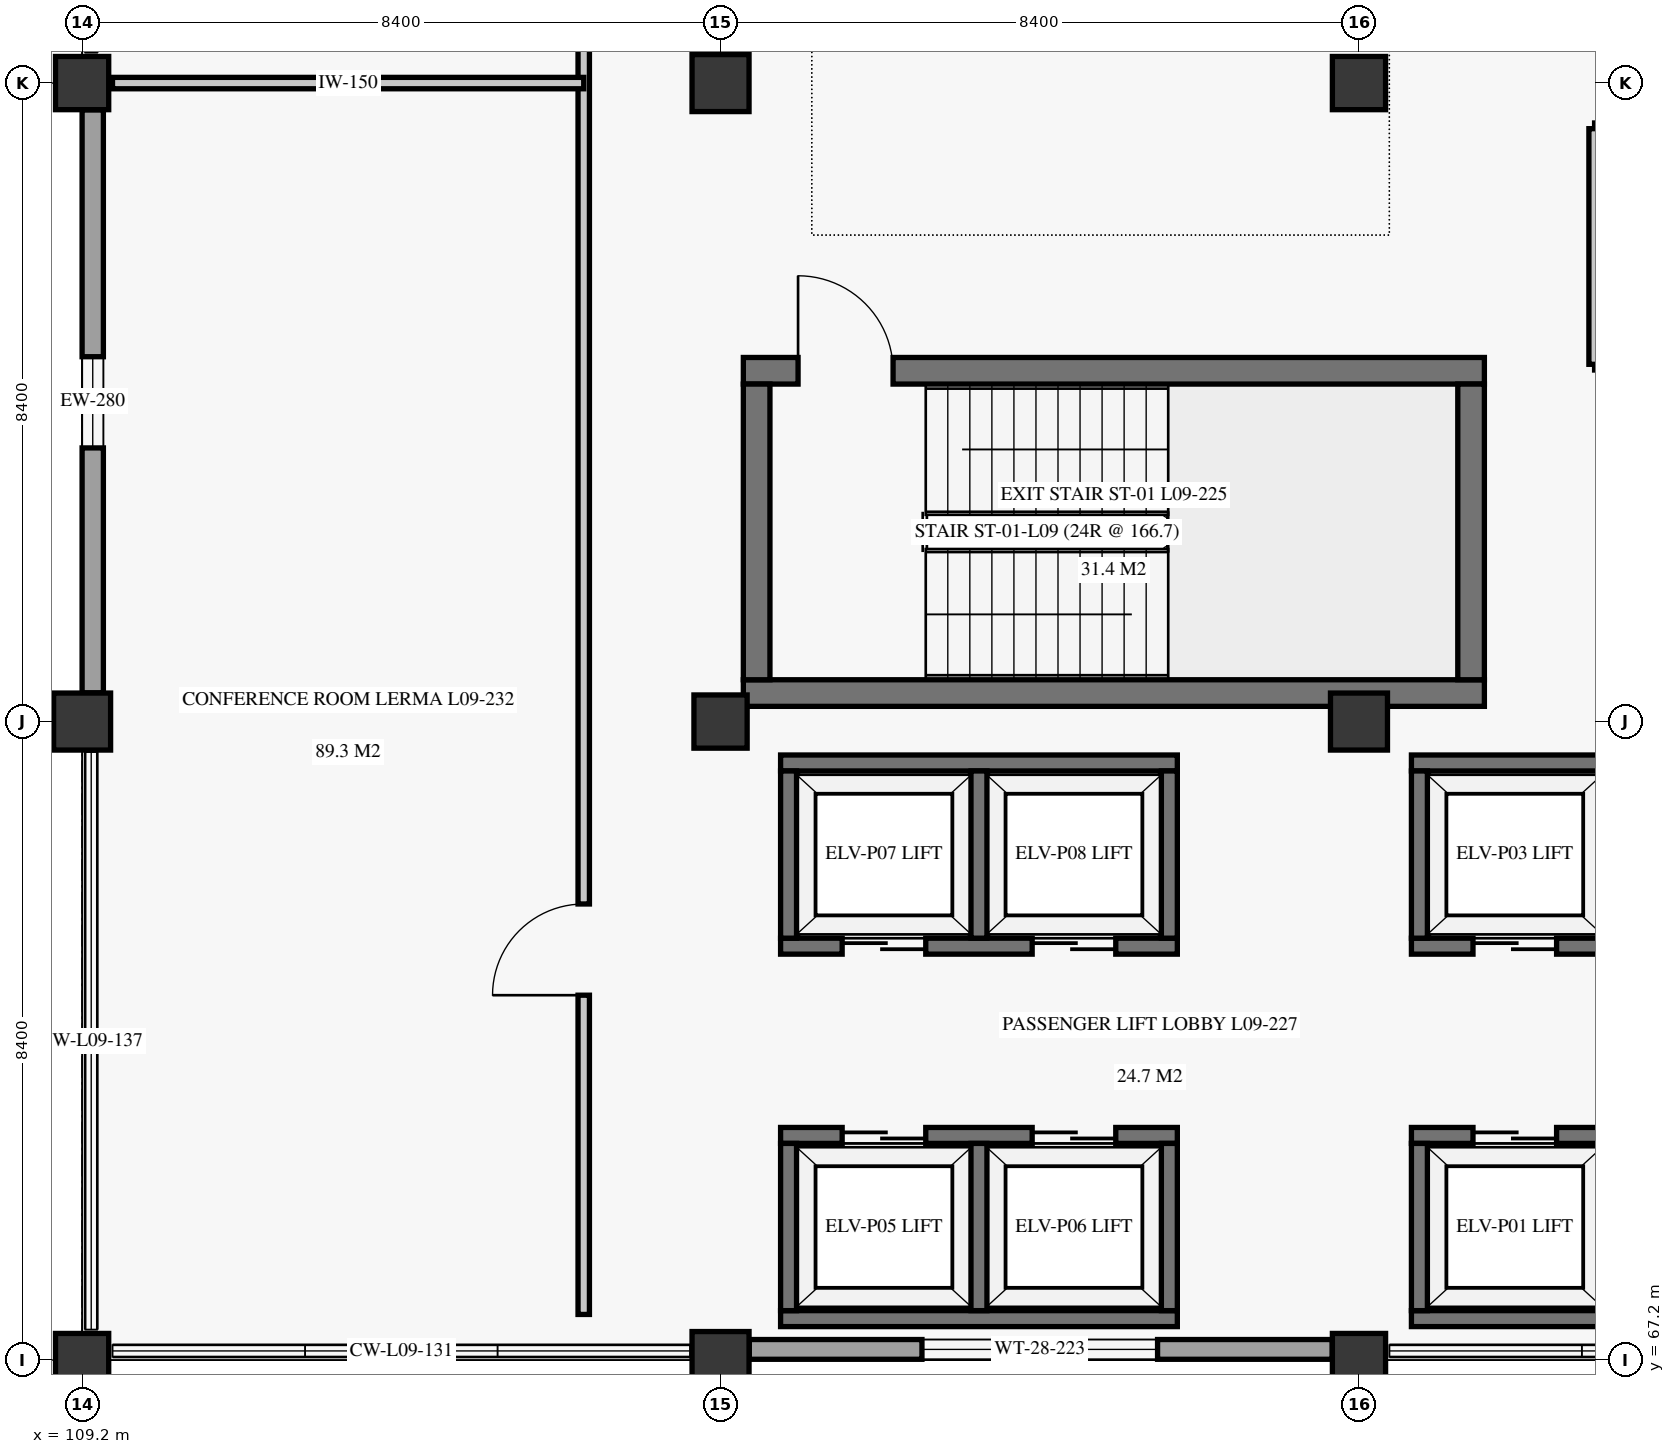
"""IFC4 building model, lengths in metres.
Left out: names, types, materials, properties, quantities, classifications, styles, units other than length and angle.
Written with IfcOpenShell. Run it as: python <this file> out.ifc"""

import sys

from ifc_helpers import new_model, si_unit, direction, frame, frame_2d, origin, origin_2d, place, context, subcontext, project, spatial, rectangle, extrude, element, fill, save


model = new_model("IFC4")
c1 = context("Model", 3, precision=1e-05, world=origin(), true_north=direction((0.0, 1.0)))
c2 = subcontext(c1, "Body", "Model", "MODEL_VIEW")
j1 = project(units=[si_unit("LENGTHUNIT", "METRE"), si_unit("PLANEANGLEUNIT", "RADIAN")], contexts=[c1])
p1 = place(None, origin())
s1 = spatial("IfcSite", under=j1, at=p1, CompositionType="ELEMENT")
p2 = place(p1, origin())
s2 = spatial("IfcBuilding", under=s1, at=p2, CompositionType="ELEMENT")
p3 = place(p2, frame((0.0, 0.0, 38.7)))
s3 = spatial("IfcBuildingStorey", under=s2, at=p3, CompositionType="ELEMENT", Elevation=38.7)
p4 = place(p3, frame((109.2, 67.2, 0.0), z_axis=(0.0, 0.0, 1.0), x_axis=(1.0, 0.0, 0.0)))
e1 = element("IfcColumn", 1, at=p4, inside=s3, PredefinedType="COLUMN", context=c2, shape_type="SweptSolid", body=[
    extrude(rectangle(XDim=0.7, YDim=0.7, at=origin_2d()), origin(), (0.0, 0.0, 1.0), 3.72),
])
p5 = place(p3, frame((109.2, 75.6, 0.0), z_axis=(0.0, 0.0, 1.0), x_axis=(1.0, 0.0, 0.0)))
e2 = element("IfcColumn", 2, at=p5, inside=s3, PredefinedType="COLUMN", context=c2, shape_type="SweptSolid", body=[
    extrude(rectangle(XDim=0.75, YDim=0.75, at=origin_2d()), origin(), (0.0, 0.0, 1.0), 3.72),
])
p6 = place(p3, frame((109.2, 84.0, 0.0), z_axis=(0.0, 0.0, 1.0), x_axis=(1.0, 0.0, 0.0)))
e3 = element("IfcColumn", 3, at=p6, inside=s3, PredefinedType="COLUMN", context=c2, shape_type="SweptSolid", body=[
    extrude(rectangle(XDim=0.7, YDim=0.7, at=origin_2d()), origin(), (0.0, 0.0, 1.0), 3.72),
])
p7 = place(p3, frame((117.6, 67.2, 0.0), z_axis=(0.0, 0.0, 1.0), x_axis=(1.0, 0.0, 0.0)))
e4 = element("IfcColumn", 4, at=p7, inside=s3, PredefinedType="COLUMN", context=c2, shape_type="SweptSolid", body=[
    extrude(rectangle(XDim=0.75, YDim=0.75, at=origin_2d()), origin(), (0.0, 0.0, 1.0), 3.72),
])
p8 = place(p3, frame((117.6, 75.6, 0.0), z_axis=(0.0, 0.0, 1.0), x_axis=(1.0, 0.0, 0.0)))
e5 = element("IfcColumn", 5, at=p8, inside=s3, PredefinedType="COLUMN", context=c2, shape_type="SweptSolid", body=[
    extrude(rectangle(XDim=0.7, YDim=0.7, at=origin_2d()), origin(), (0.0, 0.0, 1.0), 3.72),
])
p9 = place(p3, frame((117.6, 84.0, 0.0), z_axis=(0.0, 0.0, 1.0), x_axis=(1.0, 0.0, 0.0)))
e6 = element("IfcColumn", 6, at=p9, inside=s3, PredefinedType="COLUMN", context=c2, shape_type="SweptSolid", body=[
    extrude(rectangle(XDim=0.75, YDim=0.75, at=origin_2d()), origin(), (0.0, 0.0, 1.0), 3.72),
])
p10 = place(p3, frame((126.0, 67.2, 0.0), z_axis=(0.0, 0.0, 1.0), x_axis=(1.0, 0.0, 0.0)))
e7 = element("IfcColumn", 7, at=p10, inside=s3, PredefinedType="COLUMN", context=c2, shape_type="SweptSolid", body=[
    extrude(rectangle(XDim=0.7, YDim=0.7, at=origin_2d()), origin(), (0.0, 0.0, 1.0), 3.72),
])
p11 = place(p3, frame((126.0, 75.6, 0.0), z_axis=(0.0, 0.0, 1.0), x_axis=(1.0, 0.0, 0.0)))
e8 = element("IfcColumn", 8, at=p11, inside=s3, PredefinedType="COLUMN", context=c2, shape_type="SweptSolid", body=[
    extrude(rectangle(XDim=0.75, YDim=0.75, at=origin_2d()), origin(), (0.0, 0.0, 1.0), 3.72),
])
p12 = place(p3, frame((126.0, 84.0, 0.0), z_axis=(0.0, 0.0, 1.0), x_axis=(1.0, 0.0, 0.0)))
e9 = element("IfcColumn", 9, at=p12, inside=s3, PredefinedType="COLUMN", context=c2, shape_type="SweptSolid", body=[
    extrude(rectangle(XDim=0.7, YDim=0.7, at=origin_2d()), origin(), (0.0, 0.0, 1.0), 3.72),
])
p13 = place(p3, frame((117.978, 67.34, 0.0), z_axis=(0.0, 0.0, 1.0), x_axis=(1.0, 0.0, 0.0)))
e10 = element("IfcWall", 10, at=p13, inside=s3, PredefinedType="SOLIDWALL", context=c2, shape_type="SweptSolid", body=[
    extrude(rectangle(XDim=7.67, YDim=0.26, at=frame_2d((3.835, 0.0))), origin(), (0.0, 0.0, 1.0), 3.04),
])
p14 = place(p13, frame((2.272, 0.0, 0.85)))
e11 = element("IfcOpeningElement", 11, at=p14, cuts=e10, PredefinedType="OPENING", context=c2, shape_type="SweptSolid", body=[
    extrude(rectangle(XDim=3.1, YDim=1.85, at=frame_2d((1.55, 0.925))), frame((0.0, 0.14, 0.0), z_axis=(0.0, -1.0, 0.0), x_axis=(1.0, 0.0, 0.0)), (0.0, 0.0, 1.0), 0.28),
])
p15 = place(p3, frame((109.34, 75.978, 0.0), z_axis=(0.0, 0.0, 1.0), x_axis=(0.0, 1.0, 0.0)))
e12 = element("IfcWall", 12, at=p15, inside=s3, PredefinedType="SOLIDWALL", context=c2, shape_type="SweptSolid", body=[
    extrude(rectangle(XDim=7.67, YDim=0.28, at=frame_2d((3.835, 0.0))), origin(), (0.0, 0.0, 1.0), 3.04),
])
p16 = place(p15, frame((3.222, 0.0, 0.85)))
e13 = element("IfcOpeningElement", 13, at=p16, cuts=e12, PredefinedType="OPENING", context=c2, shape_type="SweptSolid", body=[
    extrude(rectangle(XDim=1.2, YDim=1.6, at=frame_2d((0.6, 0.8))), frame((0.0, 0.15, 0.0), z_axis=(0.0, -1.0, 0.0), x_axis=(1.0, 0.0, 0.0)), (0.0, 0.0, 1.0), 0.3),
])
p17 = place(p3, frame((117.9, 75.975, 0.0), z_axis=(0.0, 0.0, 1.0), x_axis=(1.0, 0.0, 0.0)))
e14 = element("IfcWall", 14, at=p17, inside=s3, PredefinedType="SHEAR", context=c2, shape_type="SweptSolid", body=[
    extrude(rectangle(XDim=9.75, YDim=0.35, at=frame_2d((4.875, 0.0))), origin(), (0.0, 0.0, 1.0), 3.72),
])
p18 = place(p3, frame((117.9, 80.215, 0.0), z_axis=(0.0, 0.0, 1.0), x_axis=(1.0, 0.0, 0.0)))
e15 = element("IfcWall", 15, at=p18, inside=s3, PredefinedType="SHEAR", context=c2, shape_type="SweptSolid", body=[
    extrude(rectangle(XDim=9.75, YDim=0.35, at=frame_2d((4.875, 0.0))), origin(), (0.0, 0.0, 1.0), 3.72),
])
p19 = place(p18, frame((0.72, 0.0, 0.0)))
e16 = element("IfcOpeningElement", 16, at=p19, cuts=e15, PredefinedType="OPENING", context=c2, shape_type="SweptSolid", body=[
    extrude(rectangle(XDim=1.25, YDim=2.2, at=frame_2d((0.625, 1.1))), frame((0.0, 0.185, 0.0), z_axis=(0.0, -1.0, 0.0), x_axis=(1.0, 0.0, 0.0)), (0.0, 0.0, 1.0), 0.37),
])
for number, where, z_axis, x_axis in (
    (17, (118.075, 76.15, 0.0), (0.0, 0.0, 1.0), (0.0, 1.0, 0.0)),
    (18, (127.475, 76.15, 0.0), (0.0, 0.0, 1.0), (0.0, 1.0, 0.0)),
):
    element("IfcWall", number, at=place(p3, frame(where, z_axis=z_axis, x_axis=x_axis)), inside=s3, PredefinedType="SHEAR", context=c2, shape_type="SweptSolid", body=[
        extrude(rectangle(XDim=3.89, YDim=0.35, at=frame_2d((1.945, 0.0))), origin(), (0.0, 0.0, 1.0), 3.72),
    ])
p20 = place(p3, frame((126.69, 67.745, 0.0), z_axis=(0.0, 0.0, 1.0), x_axis=(1.0, 0.0, 0.0)))
e19 = element("IfcWall", 19, at=p20, inside=s3, PredefinedType="SHEAR", context=c2, shape_type="SweptSolid", body=[
    extrude(rectangle(XDim=5.22, YDim=0.21, at=frame_2d((2.61, 0.0))), origin(), (0.0, 0.0, 1.0), 3.72),
])
p21 = place(p3, frame((126.69, 70.155, 0.0), z_axis=(0.0, 0.0, 1.0), x_axis=(1.0, 0.0, 0.0)))
e20 = element("IfcWall", 20, at=p21, inside=s3, PredefinedType="SHEAR", context=c2, shape_type="SweptSolid", body=[
    extrude(rectangle(XDim=5.22, YDim=0.21, at=frame_2d((2.61, 0.0))), origin(), (0.0, 0.0, 1.0), 3.72),
])
p22 = place(p21, frame((0.81, 0.0, 0.0)))
e21 = element("IfcOpeningElement", 21, at=p22, cuts=e20, PredefinedType="OPENING", context=c2, shape_type="SweptSolid", body=[
    extrude(rectangle(XDim=1.1, YDim=2.15, at=frame_2d((0.55, 1.075))), frame((0.0, 0.115, 0.0), z_axis=(0.0, -1.0, 0.0), x_axis=(1.0, 0.0, 0.0)), (0.0, 0.0, 1.0), 0.23),
])
p23 = place(p21, frame((3.31, 0.0, 0.0)))
e22 = element("IfcOpeningElement", 22, at=p23, cuts=e20, PredefinedType="OPENING", context=c2, shape_type="SweptSolid", body=[
    extrude(rectangle(XDim=1.1, YDim=2.15, at=frame_2d((0.55, 1.075))), frame((0.0, 0.115, 0.0), z_axis=(0.0, -1.0, 0.0), x_axis=(1.0, 0.0, 0.0)), (0.0, 0.0, 1.0), 0.23),
])
p24 = place(p3, frame((126.795, 67.85, 0.0), z_axis=(0.0, 0.0, 1.0), x_axis=(0.0, 1.0, 0.0)))
e23 = element("IfcWall", 23, at=p24, inside=s3, PredefinedType="SHEAR", context=c2, shape_type="SweptSolid", body=[
    extrude(rectangle(XDim=2.2, YDim=0.21, at=frame_2d((1.1, 0.0))), origin(), (0.0, 0.0, 1.0), 3.72),
])
p25 = place(p3, frame((126.69, 72.645, 0.0), z_axis=(0.0, 0.0, 1.0), x_axis=(1.0, 0.0, 0.0)))
e24 = element("IfcWall", 24, at=p25, inside=s3, PredefinedType="SHEAR", context=c2, shape_type="SweptSolid", body=[
    extrude(rectangle(XDim=5.22, YDim=0.21, at=frame_2d((2.61, 0.0))), origin(), (0.0, 0.0, 1.0), 3.72),
])
p26 = place(p25, frame((0.81, 0.0, 0.0)))
e25 = element("IfcOpeningElement", 25, at=p26, cuts=e24, PredefinedType="OPENING", context=c2, shape_type="SweptSolid", body=[
    extrude(rectangle(XDim=1.1, YDim=2.15, at=frame_2d((0.55, 1.075))), frame((0.0, 0.115, 0.0), z_axis=(0.0, -1.0, 0.0), x_axis=(1.0, 0.0, 0.0)), (0.0, 0.0, 1.0), 0.23),
])
p27 = place(p25, frame((3.31, 0.0, 0.0)))
e26 = element("IfcOpeningElement", 26, at=p27, cuts=e24, PredefinedType="OPENING", context=c2, shape_type="SweptSolid", body=[
    extrude(rectangle(XDim=1.1, YDim=2.15, at=frame_2d((0.55, 1.075))), frame((0.0, 0.115, 0.0), z_axis=(0.0, -1.0, 0.0), x_axis=(1.0, 0.0, 0.0)), (0.0, 0.0, 1.0), 0.23),
])
p28 = place(p3, frame((126.69, 75.055, 0.0), z_axis=(0.0, 0.0, 1.0), x_axis=(1.0, 0.0, 0.0)))
e27 = element("IfcWall", 27, at=p28, inside=s3, PredefinedType="SHEAR", context=c2, shape_type="SweptSolid", body=[
    extrude(rectangle(XDim=5.22, YDim=0.21, at=frame_2d((2.61, 0.0))), origin(), (0.0, 0.0, 1.0), 3.72),
])
p29 = place(p3, frame((126.795, 72.75, 0.0), z_axis=(0.0, 0.0, 1.0), x_axis=(0.0, 1.0, 0.0)))
e28 = element("IfcWall", 28, at=p29, inside=s3, PredefinedType="SHEAR", context=c2, shape_type="SweptSolid", body=[
    extrude(rectangle(XDim=2.2, YDim=0.21, at=frame_2d((1.1, 0.0))), origin(), (0.0, 0.0, 1.0), 3.72),
])
p30 = place(p3, frame((118.39, 67.745, 0.0), z_axis=(0.0, 0.0, 1.0), x_axis=(1.0, 0.0, 0.0)))
e29 = element("IfcWall", 29, at=p30, inside=s3, PredefinedType="SHEAR", context=c2, shape_type="SweptSolid", body=[
    extrude(rectangle(XDim=5.22, YDim=0.21, at=frame_2d((2.61, 0.0))), origin(), (0.0, 0.0, 1.0), 3.72),
])
p31 = place(p3, frame((118.39, 70.155, 0.0), z_axis=(0.0, 0.0, 1.0), x_axis=(1.0, 0.0, 0.0)))
e30 = element("IfcWall", 30, at=p31, inside=s3, PredefinedType="SHEAR", context=c2, shape_type="SweptSolid", body=[
    extrude(rectangle(XDim=5.22, YDim=0.21, at=frame_2d((2.61, 0.0))), origin(), (0.0, 0.0, 1.0), 3.72),
])
p32 = place(p31, frame((0.81, 0.0, 0.0)))
e31 = element("IfcOpeningElement", 31, at=p32, cuts=e30, PredefinedType="OPENING", context=c2, shape_type="SweptSolid", body=[
    extrude(rectangle(XDim=1.1, YDim=2.15, at=frame_2d((0.55, 1.075))), frame((0.0, 0.115, 0.0), z_axis=(0.0, -1.0, 0.0), x_axis=(1.0, 0.0, 0.0)), (0.0, 0.0, 1.0), 0.23),
])
p33 = place(p31, frame((3.31, 0.0, 0.0)))
e32 = element("IfcOpeningElement", 32, at=p33, cuts=e30, PredefinedType="OPENING", context=c2, shape_type="SweptSolid", body=[
    extrude(rectangle(XDim=1.1, YDim=2.15, at=frame_2d((0.55, 1.075))), frame((0.0, 0.115, 0.0), z_axis=(0.0, -1.0, 0.0), x_axis=(1.0, 0.0, 0.0)), (0.0, 0.0, 1.0), 0.23),
])
for number, where, z_axis, x_axis in (
    (33, (118.495, 67.85, 0.0), (0.0, 0.0, 1.0), (0.0, 1.0, 0.0)),
    (34, (123.505, 67.85, 0.0), (0.0, 0.0, 1.0), (0.0, 1.0, 0.0)),
    (35, (121.0, 67.85, 0.0), (0.0, 0.0, 1.0), (0.0, 1.0, 0.0)),
):
    element("IfcWall", number, at=place(p3, frame(where, z_axis=z_axis, x_axis=x_axis)), inside=s3, PredefinedType="SHEAR", context=c2, shape_type="SweptSolid", body=[
        extrude(rectangle(XDim=2.2, YDim=0.21, at=frame_2d((1.1, 0.0))), origin(), (0.0, 0.0, 1.0), 3.72),
    ])
p34 = place(p3, frame((118.39, 72.645, 0.0), z_axis=(0.0, 0.0, 1.0), x_axis=(1.0, 0.0, 0.0)))
e36 = element("IfcWall", 36, at=p34, inside=s3, PredefinedType="SHEAR", context=c2, shape_type="SweptSolid", body=[
    extrude(rectangle(XDim=5.22, YDim=0.21, at=frame_2d((2.61, 0.0))), origin(), (0.0, 0.0, 1.0), 3.72),
])
p35 = place(p34, frame((0.81, 0.0, 0.0)))
e37 = element("IfcOpeningElement", 37, at=p35, cuts=e36, PredefinedType="OPENING", context=c2, shape_type="SweptSolid", body=[
    extrude(rectangle(XDim=1.1, YDim=2.15, at=frame_2d((0.55, 1.075))), frame((0.0, 0.115, 0.0), z_axis=(0.0, -1.0, 0.0), x_axis=(1.0, 0.0, 0.0)), (0.0, 0.0, 1.0), 0.23),
])
p36 = place(p34, frame((3.31, 0.0, 0.0)))
e38 = element("IfcOpeningElement", 38, at=p36, cuts=e36, PredefinedType="OPENING", context=c2, shape_type="SweptSolid", body=[
    extrude(rectangle(XDim=1.1, YDim=2.15, at=frame_2d((0.55, 1.075))), frame((0.0, 0.115, 0.0), z_axis=(0.0, -1.0, 0.0), x_axis=(1.0, 0.0, 0.0)), (0.0, 0.0, 1.0), 0.23),
])
p37 = place(p3, frame((118.39, 75.055, 0.0), z_axis=(0.0, 0.0, 1.0), x_axis=(1.0, 0.0, 0.0)))
e39 = element("IfcWall", 39, at=p37, inside=s3, PredefinedType="SHEAR", context=c2, shape_type="SweptSolid", body=[
    extrude(rectangle(XDim=5.22, YDim=0.21, at=frame_2d((2.61, 0.0))), origin(), (0.0, 0.0, 1.0), 3.72),
])
for number, where, z_axis, x_axis in (
    (40, (118.495, 72.75, 0.0), (0.0, 0.0, 1.0), (0.0, 1.0, 0.0)),
    (41, (123.505, 72.75, 0.0), (0.0, 0.0, 1.0), (0.0, 1.0, 0.0)),
    (42, (121.0, 72.75, 0.0), (0.0, 0.0, 1.0), (0.0, 1.0, 0.0)),
):
    element("IfcWall", number, at=place(p3, frame(where, z_axis=z_axis, x_axis=x_axis)), inside=s3, PredefinedType="SHEAR", context=c2, shape_type="SweptSolid", body=[
        extrude(rectangle(XDim=2.2, YDim=0.21, at=frame_2d((1.1, 0.0))), origin(), (0.0, 0.0, 1.0), 3.72),
    ])
p38 = place(p3, frame((129.1, 80.3, 0.0), z_axis=(0.0, 0.0, 1.0), x_axis=(0.0, 1.0, 0.0)))
e43 = element("IfcWall", 43, at=p38, inside=s3, PredefinedType="PARTITIONING", context=c2, shape_type="SweptSolid", body=[
    extrude(rectangle(XDim=3.1, YDim=0.15, at=frame_2d((1.55, 0.0))), origin(), (0.0, 0.0, 1.0), 3.34),
])
p39 = place(p3, frame((115.8, 67.8, 0.0), z_axis=(0.0, 0.0, 1.0), x_axis=(0.0, 1.0, 0.0)))
e44 = element("IfcWall", 44, at=p39, inside=s3, PredefinedType="PARTITIONING", context=c2, shape_type="SweptSolid", body=[
    extrude(rectangle(XDim=32.4, YDim=0.15, at=frame_2d((16.2, 0.0))), origin(), (0.0, 0.0, 1.0), 3.34),
])
p40 = place(p39, frame((4.2, 0.0, 0.0)))
e45 = element("IfcOpeningElement", 45, at=p40, cuts=e44, PredefinedType="OPENING", context=c2, shape_type="SweptSolid", body=[
    extrude(rectangle(XDim=1.2, YDim=2.3, at=frame_2d((0.6, 1.15))), frame((0.0, 0.085, 0.0), z_axis=(0.0, -1.0, 0.0), x_axis=(1.0, 0.0, 0.0)), (0.0, 0.0, 1.0), 0.17),
])
p41 = place(p39, frame((21.4, 0.0, 0.0)))
e46 = element("IfcOpeningElement", 46, at=p41, cuts=e44, PredefinedType="OPENING", context=c2, shape_type="SweptSolid", body=[
    extrude(rectangle(XDim=1.2, YDim=2.3, at=frame_2d((0.6, 1.15))), frame((0.0, 0.085, 0.0), z_axis=(0.0, -1.0, 0.0), x_axis=(1.0, 0.0, 0.0)), (0.0, 0.0, 1.0), 0.17),
])
p42 = place(p3, frame((109.6, 84.0, 0.0), z_axis=(0.0, 0.0, 1.0), x_axis=(1.0, 0.0, 0.0)))
e47 = element("IfcWall", 47, at=p42, inside=s3, PredefinedType="PARTITIONING", context=c2, shape_type="SweptSolid", body=[
    extrude(rectangle(XDim=6.2, YDim=0.15, at=frame_2d((3.1, 0.0))), origin(), (0.0, 0.0, 1.0), 3.34),
])
p43 = place(p14, origin())
e48 = element("IfcWindow", 48, at=p43, inside=s3, PartitioningType="SINGLE_PANEL", PredefinedType="WINDOW", context=c2, shape_type="SweptSolid", body=[
    extrude(rectangle(XDim=3.1, YDim=1.85, at=frame_2d((1.55, 0.925))), frame((0.0, 0.03, 0.0), z_axis=(0.0, -1.0, 0.0), x_axis=(1.0, 0.0, 0.0)), (0.0, 0.0, 1.0), 0.06),
])
fill(e11, e48)
p44 = place(p16, origin())
e49 = element("IfcWindow", 49, at=p44, inside=s3, PartitioningType="SINGLE_PANEL", PredefinedType="WINDOW", context=c2, shape_type="SweptSolid", body=[
    extrude(rectangle(XDim=1.2, YDim=1.6, at=frame_2d((0.6, 0.8))), frame((0.0, 0.03, 0.0), z_axis=(0.0, -1.0, 0.0), x_axis=(1.0, 0.0, 0.0)), (0.0, 0.0, 1.0), 0.06),
])
fill(e13, e49)
p45 = place(p19, origin())
e50 = element("IfcDoor", 50, at=p45, inside=s3, OperationType="SINGLE_SWING_LEFT", PredefinedType="DOOR", context=c2, shape_type="SweptSolid", body=[
    extrude(rectangle(XDim=1.25, YDim=2.2, at=frame_2d((0.625, 1.1))), frame((0.0, 0.025, 0.0), z_axis=(0.0, -1.0, 0.0), x_axis=(1.0, 0.0, 0.0)), (0.0, 0.0, 1.0), 0.05),
])
fill(e16, e50)
p46 = place(p22, origin())
e51 = element("IfcDoor", 51, at=p46, inside=s3, OperationType="DOUBLE_DOOR_SLIDING", PredefinedType="DOOR", context=c2, shape_type="SweptSolid", body=[
    extrude(rectangle(XDim=1.1, YDim=2.15, at=frame_2d((0.55, 1.075))), frame((0.0, 0.025, 0.0), z_axis=(0.0, -1.0, 0.0), x_axis=(1.0, 0.0, 0.0)), (0.0, 0.0, 1.0), 0.05),
])
fill(e21, e51)
p47 = place(p26, origin())
e52 = element("IfcDoor", 52, at=p47, inside=s3, OperationType="DOUBLE_DOOR_SLIDING", PredefinedType="DOOR", context=c2, shape_type="SweptSolid", body=[
    extrude(rectangle(XDim=1.1, YDim=2.15, at=frame_2d((0.55, 1.075))), frame((0.0, 0.025, 0.0), z_axis=(0.0, -1.0, 0.0), x_axis=(1.0, 0.0, 0.0)), (0.0, 0.0, 1.0), 0.05),
])
fill(e25, e52)
p48 = place(p32, origin())
e53 = element("IfcDoor", 53, at=p48, inside=s3, OperationType="DOUBLE_DOOR_SLIDING", PredefinedType="DOOR", context=c2, shape_type="SweptSolid", body=[
    extrude(rectangle(XDim=1.1, YDim=2.15, at=frame_2d((0.55, 1.075))), frame((0.0, 0.025, 0.0), z_axis=(0.0, -1.0, 0.0), x_axis=(1.0, 0.0, 0.0)), (0.0, 0.0, 1.0), 0.05),
])
fill(e31, e53)
p49 = place(p33, origin())
e54 = element("IfcDoor", 54, at=p49, inside=s3, OperationType="DOUBLE_DOOR_SLIDING", PredefinedType="DOOR", context=c2, shape_type="SweptSolid", body=[
    extrude(rectangle(XDim=1.1, YDim=2.15, at=frame_2d((0.55, 1.075))), frame((0.0, 0.025, 0.0), z_axis=(0.0, -1.0, 0.0), x_axis=(1.0, 0.0, 0.0)), (0.0, 0.0, 1.0), 0.05),
])
fill(e32, e54)
p50 = place(p35, origin())
e55 = element("IfcDoor", 55, at=p50, inside=s3, OperationType="DOUBLE_DOOR_SLIDING", PredefinedType="DOOR", context=c2, shape_type="SweptSolid", body=[
    extrude(rectangle(XDim=1.1, YDim=2.15, at=frame_2d((0.55, 1.075))), frame((0.0, 0.025, 0.0), z_axis=(0.0, -1.0, 0.0), x_axis=(1.0, 0.0, 0.0)), (0.0, 0.0, 1.0), 0.05),
])
fill(e37, e55)
p51 = place(p36, origin())
e56 = element("IfcDoor", 56, at=p51, inside=s3, OperationType="DOUBLE_DOOR_SLIDING", PredefinedType="DOOR", context=c2, shape_type="SweptSolid", body=[
    extrude(rectangle(XDim=1.1, YDim=2.15, at=frame_2d((0.55, 1.075))), frame((0.0, 0.025, 0.0), z_axis=(0.0, -1.0, 0.0), x_axis=(1.0, 0.0, 0.0)), (0.0, 0.0, 1.0), 0.05),
])
fill(e38, e56)
p52 = place(p40, origin())
e57 = element("IfcDoor", 57, at=p52, inside=s3, OperationType="SINGLE_SWING_LEFT", PredefinedType="DOOR", context=c2, shape_type="SweptSolid", body=[
    extrude(rectangle(XDim=1.2, YDim=2.3, at=frame_2d((0.6, 1.15))), frame((0.0, 0.025, 0.0), z_axis=(0.0, -1.0, 0.0), x_axis=(1.0, 0.0, 0.0)), (0.0, 0.0, 1.0), 0.05),
])
fill(e45, e57)
save(model, sys.argv[1])
